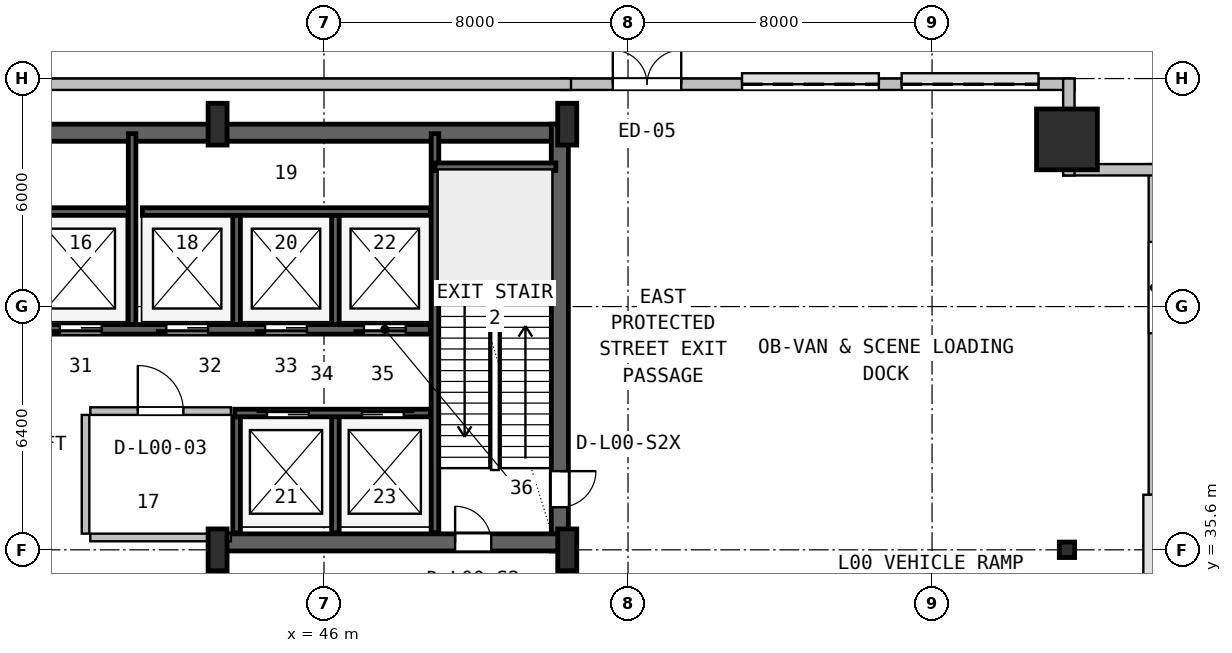
"""IFC4 building model, lengths in metres.
Left out: names, types, materials, properties, quantities, classifications, styles, units other than length and angle.
Written with IfcOpenShell. Run it as: python <this file> out.ifc"""

import sys

from ifc_helpers import new_model, si_unit, direction, frame, frame_2d, origin, origin_2d, place, context, subcontext, project, spatial, rectangle, hollow_rectangle, i_section, extrude, source, transform, mapped, element, fill, save


model = new_model("IFC4")
c1 = context("Model", 3, precision=1e-05, world=origin(), true_north=direction((0.0, 1.0)))
c2 = subcontext(c1, "Body", "Model", "MODEL_VIEW")
j1 = project(units=[si_unit("LENGTHUNIT", "METRE"), si_unit("PLANEANGLEUNIT", "RADIAN")], contexts=[c1])
p1 = place(None, origin())
s1 = spatial("IfcSite", under=j1, at=p1, CompositionType="ELEMENT")
p2 = place(p1, origin())
s2 = spatial("IfcBuilding", under=s1, at=p2, CompositionType="ELEMENT")
p3 = place(p2, origin())
s3 = spatial("IfcBuildingStorey", under=s2, at=p3, CompositionType="ELEMENT", Elevation=0.0)
p4 = place(p3, frame((15.6, 46.575, 0.0), z_axis=(0.0, 0.0, 1.0), x_axis=(1.0, 0.0, 0.0)))
e1 = element("IfcWall", 1, at=p4, inside=s3, PredefinedType="SHEAR", context=c2, shape_type="SweptSolid", body=[
    extrude(rectangle(XDim=36.8, YDim=0.45, at=frame_2d((18.4, 0.0))), origin(), (0.0, 0.0, 1.0), 5.72),
])
p5 = place(p3, frame((52.205, 35.57, 0.0), z_axis=(0.0, 0.0, 1.0), x_axis=(0.0, 1.0, 0.0)))
e2 = element("IfcWall", 2, at=p5, inside=s3, PredefinedType="SHEAR", context=c2, shape_type="SweptSolid", body=[
    extrude(rectangle(XDim=11.23, YDim=0.45, at=frame_2d((5.615, 0.0))), origin(), (0.0, 0.0, 1.0), 5.72),
])
p6 = place(p5, frame((1.15, 0.0, 0.0)))
e3 = element("IfcOpeningElement", 3, at=p6, cuts=e2, PredefinedType="OPENING", context=c2, shape_type="SweptSolid", body=[
    extrude(rectangle(XDim=0.95, YDim=2.1, at=frame_2d((0.475, 1.05))), frame((0.0, 0.235, 0.0), z_axis=(0.0, -1.0, 0.0), x_axis=(1.0, 0.0, 0.0)), (0.0, 0.0, 1.0), 0.47),
])
p7 = place(p3, frame((43.2, 35.795, 0.0), z_axis=(0.0, 0.0, 1.0), x_axis=(1.0, 0.0, 0.0)))
e4 = element("IfcWall", 4, at=p7, inside=s3, PredefinedType="SHEAR", context=c2, shape_type="SweptSolid", body=[
    extrude(rectangle(XDim=9.23, YDim=0.45, at=frame_2d((4.615, 0.0))), origin(), (0.0, 0.0, 1.0), 5.72),
])
p8 = place(p7, frame((6.25, 0.0, 0.0)))
e5 = element("IfcOpeningElement", 5, at=p8, cuts=e4, PredefinedType="OPENING", context=c2, shape_type="SweptSolid", body=[
    extrude(rectangle(XDim=0.95, YDim=2.1, at=frame_2d((0.475, 1.05))), frame((0.0, 0.235, 0.0), z_axis=(0.0, -1.0, 0.0), x_axis=(1.0, 0.0, 0.0)), (0.0, 0.0, 1.0), 0.47),
])
m1 = source(origin(), c2, "Body", "SweptSolid", [
    extrude(i_section(OverallWidth=0.5, OverallDepth=1.1, WebThickness=0.018, FlangeThickness=0.032, FilletRadius=0.018, at=origin_2d()), origin(), (0.0, 0.0, 1.0), 6.0),
])
for number, where, z_axis, x_axis in (
    (6, (43.2, 35.6, 0.0), (0.0, 0.0, 1.0), (1.0, 0.0, 0.0)),
    (7, (43.2, 46.8, 0.0), (0.0, 0.0, 1.0), (1.0, 0.0, 0.0)),
    (8, (52.4, 35.6, 0.0), (0.0, 0.0, 1.0), (1.0, 0.0, 0.0)),
    (9, (52.4, 46.8, 0.0), (0.0, 0.0, 1.0), (1.0, 0.0, 0.0)),
):
    element("IfcColumn", number, at=place(p3, frame(where, z_axis=z_axis, x_axis=x_axis)), inside=s3, PredefinedType="COLUMN", context=c2, shape_type="MappedRepresentation", body=[
        mapped(m1, transform((0.0, 0.0, 0.0), x_axis=(1.0, 0.0, 0.0), y_axis=(0.0, 1.0, 0.0), z_axis=(0.0, 0.0, 1.0), scale=1.0)),
    ])
m2 = source(origin(), c2, "Body", "SweptSolid", [
    extrude(hollow_rectangle(XDim=1.6, YDim=1.6, WallThickness=0.06, at=origin_2d()), origin(), (0.0, 0.0, 1.0), 6.0),
])
p9 = place(p3, frame((65.55, 46.4, 0.0), z_axis=(0.0, 0.0, 1.0), x_axis=(1.0, 0.0, 0.0)))
e10 = element("IfcColumn", 10, at=p9, inside=s3, PredefinedType="COLUMN", context=c2, shape_type="MappedRepresentation", body=[
    mapped(m2, transform((0.0, 0.0, 0.0), x_axis=(1.0, 0.0, 0.0), y_axis=(0.0, 1.0, 0.0), z_axis=(0.0, 0.0, 1.0), scale=1.0)),
])
m3 = source(origin(), c2, "Body", "SweptSolid", [
    extrude(i_section(OverallWidth=0.404, OverallDepth=0.407, WebThickness=0.027, FlangeThickness=0.044, FilletRadius=0.018, at=origin_2d()), origin(), (0.0, 0.0, 1.0), 6.0),
])
p10 = place(p3, frame((65.55, 35.6, 0.0), z_axis=(0.0, 0.0, 1.0), x_axis=(1.0, 0.0, 0.0)))
e11 = element("IfcColumn", 11, at=p10, inside=s3, PredefinedType="COLUMN", context=c2, shape_type="MappedRepresentation", body=[
    mapped(m3, transform((0.0, 0.0, 0.0), x_axis=(1.0, 0.0, 0.0), y_axis=(0.0, 1.0, 0.0), z_axis=(0.0, 0.0, 1.0), scale=1.0)),
])
p11 = place(p3, frame((52.25, 47.85, 0.0), z_axis=(0.0, 0.0, 1.0), x_axis=(1.0, 0.0, 0.0)))
e12 = element("IfcWall", 12, at=p11, inside=s3, PredefinedType="SOLIDWALL", context=c2, shape_type="SweptSolid", body=[
    extrude(rectangle(XDim=13.5, YDim=0.3, at=frame_2d((6.75, 0.0))), origin(), (0.0, 0.0, 1.0), 5.7),
])
p12 = place(p11, frame((1.35, 0.0, 0.0)))
e13 = element("IfcOpeningElement", 13, at=p12, cuts=e12, PredefinedType="OPENING", context=c2, shape_type="SweptSolid", body=[
    extrude(rectangle(XDim=1.8, YDim=2.15, at=frame_2d((0.9, 1.075))), frame((0.0, 0.16, 0.0), z_axis=(0.0, -1.0, 0.0), x_axis=(1.0, 0.0, 0.0)), (0.0, 0.0, 1.0), 0.32),
])
p13 = place(p11, frame((4.75, 0.0, 0.0)))
e14 = element("IfcOpeningElement", 14, at=p13, cuts=e12, PredefinedType="OPENING", context=c2, shape_type="SweptSolid", body=[
    extrude(rectangle(XDim=3.6, YDim=2.7, at=frame_2d((1.8, 1.35))), frame((0.0, 0.16, 0.0), z_axis=(0.0, -1.0, 0.0), x_axis=(1.0, 0.0, 0.0)), (0.0, 0.0, 1.0), 0.32),
])
p14 = place(p11, frame((8.95, 0.0, 0.0)))
e15 = element("IfcOpeningElement", 15, at=p14, cuts=e12, PredefinedType="OPENING", context=c2, shape_type="SweptSolid", body=[
    extrude(rectangle(XDim=3.6, YDim=2.7, at=frame_2d((1.8, 1.35))), frame((0.0, 0.16, 0.0), z_axis=(0.0, -1.0, 0.0), x_axis=(1.0, 0.0, 0.0)), (0.0, 0.0, 1.0), 0.32),
])
p15 = place(p3, frame((15.5, 47.85, 0.0), z_axis=(0.0, 0.0, 1.0), x_axis=(1.0, 0.0, 0.0)))
e16 = element("IfcWall", 16, at=p15, inside=s3, PredefinedType="SOLIDWALL", context=c2, shape_type="SweptSolid", body=[
    extrude(rectangle(XDim=37.0, YDim=0.3, at=frame_2d((18.5, 0.0))), origin(), (0.0, 0.0, 1.0), 5.7),
])
p16 = place(p3, frame((67.85, 26.5, 0.0), z_axis=(0.0, 0.0, 1.0), x_axis=(0.0, 1.0, 0.0)))
e17 = element("IfcWall", 17, at=p16, inside=s3, PredefinedType="SOLIDWALL", context=c2, shape_type="SweptSolid", body=[
    extrude(rectangle(XDim=19.25, YDim=0.3, at=frame_2d((9.625, 0.0))), origin(), (0.0, 0.0, 1.0), 5.7),
])
p17 = place(p16, frame((6.95, 0.0, 0.0)))
e18 = element("IfcOpeningElement", 18, at=p17, cuts=e17, PredefinedType="OPENING", context=c2, shape_type="SweptSolid", body=[
    extrude(rectangle(XDim=3.6, YDim=2.7, at=frame_2d((1.8, 1.35))), frame((0.0, 0.16, 0.0), z_axis=(0.0, -1.0, 0.0), x_axis=(1.0, 0.0, 0.0)), (0.0, 0.0, 1.0), 0.32),
])
p18 = place(p16, frame((14.8, 0.0, 0.9)))
e19 = element("IfcOpeningElement", 19, at=p18, cuts=e17, PredefinedType="OPENING", context=c2, shape_type="SweptSolid", body=[
    extrude(rectangle(XDim=2.4, YDim=2.4, at=frame_2d((1.2, 1.2))), frame((0.0, 0.16, 0.0), z_axis=(0.0, -1.0, 0.0), x_axis=(1.0, 0.0, 0.0)), (0.0, 0.0, 1.0), 0.32),
])
for number, where, z_axis, x_axis in (
    (20, (65.45, 45.6, 0.0), (0.0, 0.0, 1.0), (1.0, 0.0, 0.0)),
    (21, (65.6, 45.45, 0.0), (0.0, 0.0, 1.0), (0.0, 1.0, 0.0)),
):
    element("IfcWall", number, at=place(p3, frame(where, z_axis=z_axis, x_axis=x_axis)), inside=s3, PredefinedType="SOLIDWALL", context=c2, shape_type="SweptSolid", body=[
        extrude(rectangle(XDim=2.55, YDim=0.3, at=frame_2d((1.275, 0.0))), origin(), (0.0, 0.0, 1.0), 4.783),
    ])
p19 = place(p3, frame((48.92, 36.05, 0.0), z_axis=(0.0, 0.0, 1.0), x_axis=(0.0, 1.0, 0.0)))
e22 = element("IfcWall", 22, at=p19, inside=s3, PredefinedType="SHEAR", context=c2, shape_type="SweptSolid", body=[
    extrude(rectangle(XDim=10.5, YDim=0.2, at=frame_2d((5.25, 0.0))), origin(), (0.0, 0.0, 1.0), 5.72),
])
p20 = place(p3, frame((48.92, 45.68, 0.0), z_axis=(0.0, 0.0, 1.0), x_axis=(1.0, 0.0, 0.0)))
e23 = element("IfcWall", 23, at=p20, inside=s3, PredefinedType="SHEAR", context=c2, shape_type="SweptSolid", body=[
    extrude(rectangle(XDim=3.18, YDim=0.2, at=frame_2d((1.59, 0.0))), origin(), (0.0, 0.0, 1.0), 5.72),
])
p21 = place(p3, frame((24.98, 41.4, 0.0), z_axis=(0.0, 0.0, 1.0), x_axis=(1.0, 0.0, 0.0)))
e24 = element("IfcWall", 24, at=p21, inside=s3, PredefinedType="SHEAR", context=c2, shape_type="SweptSolid", body=[
    extrude(rectangle(XDim=23.82, YDim=0.25, at=frame_2d((11.91, 0.0))), origin(), (0.0, 0.0, 1.0), 5.72),
])
p22 = place(p21, frame((0.87, 0.0, 0.0)))
e25 = element("IfcOpeningElement", 25, at=p22, cuts=e24, PredefinedType="OPENING", context=c2, shape_type="SweptSolid", body=[
    extrude(rectangle(XDim=1.1, YDim=2.18, at=frame_2d((0.55, 1.09))), frame((0.0, 0.135, 0.0), z_axis=(0.0, -1.0, 0.0), x_axis=(1.0, 0.0, 0.0)), (0.0, 0.0, 1.0), 0.27),
])
p23 = place(p21, frame((3.47, 0.0, 0.0)))
e26 = element("IfcOpeningElement", 26, at=p23, cuts=e24, PredefinedType="OPENING", context=c2, shape_type="SweptSolid", body=[
    extrude(rectangle(XDim=1.1, YDim=2.18, at=frame_2d((0.55, 1.09))), frame((0.0, 0.135, 0.0), z_axis=(0.0, -1.0, 0.0), x_axis=(1.0, 0.0, 0.0)), (0.0, 0.0, 1.0), 0.27),
])
p24 = place(p21, frame((6.07, 0.0, 0.0)))
e27 = element("IfcOpeningElement", 27, at=p24, cuts=e24, PredefinedType="OPENING", context=c2, shape_type="SweptSolid", body=[
    extrude(rectangle(XDim=1.1, YDim=2.18, at=frame_2d((0.55, 1.09))), frame((0.0, 0.135, 0.0), z_axis=(0.0, -1.0, 0.0), x_axis=(1.0, 0.0, 0.0)), (0.0, 0.0, 1.0), 0.27),
])
p25 = place(p21, frame((8.87, 0.0, 0.0)))
e28 = element("IfcOpeningElement", 28, at=p25, cuts=e24, PredefinedType="OPENING", context=c2, shape_type="SweptSolid", body=[
    extrude(rectangle(XDim=1.1, YDim=2.18, at=frame_2d((0.55, 1.09))), frame((0.0, 0.135, 0.0), z_axis=(0.0, -1.0, 0.0), x_axis=(1.0, 0.0, 0.0)), (0.0, 0.0, 1.0), 0.27),
])
p26 = place(p21, frame((11.47, 0.0, 0.0)))
e29 = element("IfcOpeningElement", 29, at=p26, cuts=e24, PredefinedType="OPENING", context=c2, shape_type="SweptSolid", body=[
    extrude(rectangle(XDim=1.1, YDim=2.18, at=frame_2d((0.55, 1.09))), frame((0.0, 0.135, 0.0), z_axis=(0.0, -1.0, 0.0), x_axis=(1.0, 0.0, 0.0)), (0.0, 0.0, 1.0), 0.27),
])
p27 = place(p21, frame((14.07, 0.0, 0.0)))
e30 = element("IfcOpeningElement", 30, at=p27, cuts=e24, PredefinedType="OPENING", context=c2, shape_type="SweptSolid", body=[
    extrude(rectangle(XDim=1.1, YDim=2.18, at=frame_2d((0.55, 1.09))), frame((0.0, 0.135, 0.0), z_axis=(0.0, -1.0, 0.0), x_axis=(1.0, 0.0, 0.0)), (0.0, 0.0, 1.0), 0.27),
])
p28 = place(p21, frame((16.87, 0.0, 0.0)))
e31 = element("IfcOpeningElement", 31, at=p28, cuts=e24, PredefinedType="OPENING", context=c2, shape_type="SweptSolid", body=[
    extrude(rectangle(XDim=1.1, YDim=2.18, at=frame_2d((0.55, 1.09))), frame((0.0, 0.135, 0.0), z_axis=(0.0, -1.0, 0.0), x_axis=(1.0, 0.0, 0.0)), (0.0, 0.0, 1.0), 0.27),
])
p29 = place(p21, frame((19.47, 0.0, 0.0)))
e32 = element("IfcOpeningElement", 32, at=p29, cuts=e24, PredefinedType="OPENING", context=c2, shape_type="SweptSolid", body=[
    extrude(rectangle(XDim=1.1, YDim=2.18, at=frame_2d((0.55, 1.09))), frame((0.0, 0.135, 0.0), z_axis=(0.0, -1.0, 0.0), x_axis=(1.0, 0.0, 0.0)), (0.0, 0.0, 1.0), 0.27),
])
p30 = place(p21, frame((22.07, 0.0, 0.0)))
e33 = element("IfcOpeningElement", 33, at=p30, cuts=e24, PredefinedType="OPENING", context=c2, shape_type="SweptSolid", body=[
    extrude(rectangle(XDim=1.1, YDim=2.18, at=frame_2d((0.55, 1.09))), frame((0.0, 0.135, 0.0), z_axis=(0.0, -1.0, 0.0), x_axis=(1.0, 0.0, 0.0)), (0.0, 0.0, 1.0), 0.27),
])
p31 = place(p3, frame((33.22, 44.5, 0.0), z_axis=(0.0, 0.0, 1.0), x_axis=(1.0, 0.0, 0.0)))
e34 = element("IfcWall", 34, at=p31, inside=s3, PredefinedType="SHEAR", context=c2, shape_type="SweptSolid", body=[
    extrude(rectangle(XDim=7.63, YDim=0.2, at=frame_2d((3.815, 0.0))), origin(), (0.0, 0.0, 1.0), 5.72),
])
p32 = place(p3, frame((40.95, 41.53, 0.0), z_axis=(0.0, 0.0, 1.0), x_axis=(0.0, 1.0, 0.0)))
e35 = element("IfcWall", 35, at=p32, inside=s3, PredefinedType="SHEAR", context=c2, shape_type="SweptSolid", body=[
    extrude(rectangle(XDim=5.02, YDim=0.2, at=frame_2d((2.51, 0.0))), origin(), (0.0, 0.0, 1.0), 5.72),
])
p33 = place(p3, frame((41.22, 44.5, 0.0), z_axis=(0.0, 0.0, 1.0), x_axis=(1.0, 0.0, 0.0)))
e36 = element("IfcWall", 36, at=p33, inside=s3, PredefinedType="SHEAR", context=c2, shape_type="SweptSolid", body=[
    extrude(rectangle(XDim=7.58, YDim=0.2, at=frame_2d((3.79, 0.0))), origin(), (0.0, 0.0, 1.0), 5.72),
])
for number, where, z_axis, x_axis in (
    (37, (43.7, 41.53, 0.0), (0.0, 0.0, 1.0), (0.0, 1.0, 0.0)),
    (38, (46.3, 41.53, 0.0), (0.0, 0.0, 1.0), (0.0, 1.0, 0.0)),
):
    element("IfcWall", number, at=place(p3, frame(where, z_axis=z_axis, x_axis=x_axis)), inside=s3, PredefinedType="SHEAR", context=c2, shape_type="SweptSolid", body=[
        extrude(rectangle(XDim=2.87, YDim=0.2, at=frame_2d((1.435, 0.0))), origin(), (0.0, 0.0, 1.0), 5.72),
    ])
for number, where, z_axis, x_axis in (
    (39, (43.7, 36.05, 0.0), (0.0, 0.0, 1.0), (0.0, 1.0, 0.0)),
    (40, (46.3, 36.05, 0.0), (0.0, 0.0, 1.0), (0.0, 1.0, 0.0)),
):
    element("IfcWall", number, at=place(p3, frame(where, z_axis=z_axis, x_axis=x_axis)), inside=s3, PredefinedType="SHEAR", context=c2, shape_type="SweptSolid", body=[
        extrude(rectangle(XDim=3.05, YDim=0.2, at=frame_2d((1.525, 0.0))), origin(), (0.0, 0.0, 1.0), 5.72),
    ])
p34 = place(p3, frame((43.65, 39.2, 0.0), z_axis=(0.0, 0.0, 1.0), x_axis=(1.0, 0.0, 0.0)))
e41 = element("IfcWall", 41, at=p34, inside=s3, PredefinedType="SHEAR", context=c2, shape_type="SweptSolid", body=[
    extrude(rectangle(XDim=5.15, YDim=0.2, at=frame_2d((2.575, 0.0))), origin(), (0.0, 0.0, 1.0), 5.72),
])
p35 = place(p34, frame((0.85, 0.0, 0.0)))
e42 = element("IfcOpeningElement", 42, at=p35, cuts=e41, PredefinedType="OPENING", context=c2, shape_type="SweptSolid", body=[
    extrude(rectangle(XDim=1.1, YDim=2.18, at=frame_2d((0.55, 1.09))), frame((0.0, 0.11, 0.0), z_axis=(0.0, -1.0, 0.0), x_axis=(1.0, 0.0, 0.0)), (0.0, 0.0, 1.0), 0.22),
])
p36 = place(p34, frame((3.35, 0.0, 0.0)))
e43 = element("IfcOpeningElement", 43, at=p36, cuts=e41, PredefinedType="OPENING", context=c2, shape_type="SweptSolid", body=[
    extrude(rectangle(XDim=1.1, YDim=2.18, at=frame_2d((0.55, 1.09))), frame((0.0, 0.11, 0.0), z_axis=(0.0, -1.0, 0.0), x_axis=(1.0, 0.0, 0.0)), (0.0, 0.0, 1.0), 0.22),
])
p37 = place(p3, frame((39.85, 35.925, 0.0), z_axis=(0.0, 0.0, 1.0), x_axis=(1.0, 0.0, 0.0)))
e44 = element("IfcWall", 44, at=p37, inside=s3, PredefinedType="SOLIDWALL", context=c2, shape_type="SweptSolid", body=[
    extrude(rectangle(XDim=3.7, YDim=0.2, at=frame_2d((1.85, 0.0))), origin(), (0.0, 0.0, 1.0), 4.783),
])
p38 = place(p3, frame((39.85, 39.25, 0.0), z_axis=(0.0, 0.0, 1.0), x_axis=(1.0, 0.0, 0.0)))
e45 = element("IfcWall", 45, at=p38, inside=s3, PredefinedType="SOLIDWALL", context=c2, shape_type="SweptSolid", body=[
    extrude(rectangle(XDim=3.7, YDim=0.2, at=frame_2d((1.85, 0.0))), origin(), (0.0, 0.0, 1.0), 5.7),
])
p39 = place(p38, frame((1.25, 0.0, 0.0)))
e46 = element("IfcOpeningElement", 46, at=p39, cuts=e45, PredefinedType="OPENING", context=c2, shape_type="SweptSolid", body=[
    extrude(rectangle(XDim=1.2, YDim=2.1, at=frame_2d((0.6, 1.05))), frame((0.0, 0.11, 0.0), z_axis=(0.0, -1.0, 0.0), x_axis=(1.0, 0.0, 0.0)), (0.0, 0.0, 1.0), 0.22),
])
p40 = place(p3, frame((39.725, 36.025, 0.0), z_axis=(0.0, 0.0, 1.0), x_axis=(0.0, 1.0, 0.0)))
e47 = element("IfcWall", 47, at=p40, inside=s3, PredefinedType="SOLIDWALL", context=c2, shape_type="SweptSolid", body=[
    extrude(rectangle(XDim=3.125, YDim=0.2, at=frame_2d((1.562, 0.0))), origin(), (0.0, 0.0, 1.0), 5.7),
])
m4 = source(origin(), c2, "Body", "SweptSolid", [
    extrude(rectangle(XDim=1.8, YDim=2.15, at=frame_2d((0.9, 1.075))), frame((0.0, 0.025, 0.0), z_axis=(0.0, -1.0, 0.0), x_axis=(1.0, 0.0, 0.0)), (0.0, 0.0, 1.0), 0.05),
])
p41 = place(p12, origin())
e48 = element("IfcDoor", 48, at=p41, inside=s3, OperationType="DOUBLE_DOOR_SINGLE_SWING", PredefinedType="DOOR", context=c2, shape_type="MappedRepresentation", body=[
    mapped(m4, transform((0.0, 0.0, 0.0), x_axis=(1.0, 0.0, 0.0), y_axis=(0.0, 1.0, 0.0), z_axis=(0.0, 0.0, 1.0), scale=1.0)),
])
fill(e13, e48)
m5 = source(origin(), c2, "Body", "SweptSolid", [
    extrude(rectangle(XDim=3.6, YDim=2.7, at=frame_2d((1.8, 1.35))), frame((0.0, 0.025, 0.0), z_axis=(0.0, -1.0, 0.0), x_axis=(1.0, 0.0, 0.0)), (0.0, 0.0, 1.0), 0.05),
])
p42 = place(p13, origin())
e49 = element("IfcDoor", 49, at=p42, inside=s3, OperationType="ROLLINGUP", PredefinedType="GATE", context=c2, shape_type="MappedRepresentation", body=[
    mapped(m5, transform((0.0, 0.0, 0.0), x_axis=(1.0, 0.0, 0.0), y_axis=(0.0, 1.0, 0.0), z_axis=(0.0, 0.0, 1.0), scale=1.0)),
])
fill(e14, e49)
p43 = place(p14, origin())
e50 = element("IfcDoor", 50, at=p43, inside=s3, OperationType="ROLLINGUP", PredefinedType="GATE", context=c2, shape_type="MappedRepresentation", body=[
    mapped(m5, transform((0.0, 0.0, 0.0), x_axis=(1.0, 0.0, 0.0), y_axis=(0.0, 1.0, 0.0), z_axis=(0.0, 0.0, 1.0), scale=1.0)),
])
fill(e15, e50)
m6 = source(origin(), c2, "Body", "SweptSolid", [
    extrude(rectangle(XDim=0.95, YDim=2.1, at=frame_2d((0.475, 1.05))), frame((0.0, 0.025, 0.0), z_axis=(0.0, -1.0, 0.0), x_axis=(1.0, 0.0, 0.0)), (0.0, 0.0, 1.0), 0.05),
])
p44 = place(p8, origin())
e51 = element("IfcDoor", 51, at=p44, inside=s3, OperationType="SINGLE_SWING_LEFT", PredefinedType="DOOR", context=c2, shape_type="MappedRepresentation", body=[
    mapped(m6, transform((0.0, 0.0, 0.0), x_axis=(1.0, 0.0, 0.0), y_axis=(0.0, 1.0, 0.0), z_axis=(0.0, 0.0, 1.0), scale=1.0)),
])
fill(e5, e51)
m7 = source(origin(), c2, "Body", "SweptSolid", [
    extrude(rectangle(XDim=1.1, YDim=2.18, at=frame_2d((0.55, 1.09))), frame((0.0, 0.025, 0.0), z_axis=(0.0, -1.0, 0.0), x_axis=(1.0, 0.0, 0.0)), (0.0, 0.0, 1.0), 0.05),
])
p45 = place(p27, frame((1.1, 0.0, 0.0), z_axis=(0.0, 0.0, 1.0), x_axis=(-1.0, 0.0, 0.0)))
e52 = element("IfcDoor", 52, at=p45, inside=s3, OperationType="SLIDING_TO_LEFT", PredefinedType="DOOR", context=c2, shape_type="MappedRepresentation", body=[
    mapped(m7, transform((0.0, 0.0, 0.0), x_axis=(1.0, 0.0, 0.0), y_axis=(0.0, 1.0, 0.0), z_axis=(0.0, 0.0, 1.0), scale=1.0)),
])
fill(e30, e52)
p46 = place(p28, frame((1.1, 0.0, 0.0), z_axis=(0.0, 0.0, 1.0), x_axis=(-1.0, 0.0, 0.0)))
e53 = element("IfcDoor", 53, at=p46, inside=s3, OperationType="SLIDING_TO_LEFT", PredefinedType="DOOR", context=c2, shape_type="MappedRepresentation", body=[
    mapped(m7, transform((0.0, 0.0, 0.0), x_axis=(1.0, 0.0, 0.0), y_axis=(0.0, 1.0, 0.0), z_axis=(0.0, 0.0, 1.0), scale=1.0)),
])
fill(e31, e53)
p47 = place(p29, frame((1.1, 0.0, 0.0), z_axis=(0.0, 0.0, 1.0), x_axis=(-1.0, 0.0, 0.0)))
e54 = element("IfcDoor", 54, at=p47, inside=s3, OperationType="SLIDING_TO_LEFT", PredefinedType="DOOR", context=c2, shape_type="MappedRepresentation", body=[
    mapped(m7, transform((0.0, 0.0, 0.0), x_axis=(1.0, 0.0, 0.0), y_axis=(0.0, 1.0, 0.0), z_axis=(0.0, 0.0, 1.0), scale=1.0)),
])
fill(e32, e54)
p48 = place(p30, frame((1.1, 0.0, 0.0), z_axis=(0.0, 0.0, 1.0), x_axis=(-1.0, 0.0, 0.0)))
e55 = element("IfcDoor", 55, at=p48, inside=s3, OperationType="SLIDING_TO_LEFT", PredefinedType="DOOR", context=c2, shape_type="MappedRepresentation", body=[
    mapped(m7, transform((0.0, 0.0, 0.0), x_axis=(1.0, 0.0, 0.0), y_axis=(0.0, 1.0, 0.0), z_axis=(0.0, 0.0, 1.0), scale=1.0)),
])
fill(e33, e55)
p49 = place(p35, origin())
e56 = element("IfcDoor", 56, at=p49, inside=s3, OperationType="SLIDING_TO_LEFT", PredefinedType="DOOR", context=c2, shape_type="MappedRepresentation", body=[
    mapped(m7, transform((0.0, 0.0, 0.0), x_axis=(1.0, 0.0, 0.0), y_axis=(0.0, 1.0, 0.0), z_axis=(0.0, 0.0, 1.0), scale=1.0)),
])
fill(e42, e56)
p50 = place(p36, origin())
e57 = element("IfcDoor", 57, at=p50, inside=s3, OperationType="SLIDING_TO_RIGHT", PredefinedType="DOOR", context=c2, shape_type="MappedRepresentation", body=[
    mapped(m7, transform((0.0, 0.0, 0.0), x_axis=(1.0, 0.0, 0.0), y_axis=(0.0, 1.0, 0.0), z_axis=(0.0, 0.0, 1.0), scale=1.0)),
])
fill(e43, e57)
p51 = place(p6, frame((0.95, 0.0, 0.0), z_axis=(0.0, 0.0, 1.0), x_axis=(-1.0, 0.0, 0.0)))
e58 = element("IfcDoor", 58, at=p51, inside=s3, OperationType="SINGLE_SWING_RIGHT", PredefinedType="DOOR", context=c2, shape_type="MappedRepresentation", body=[
    mapped(m6, transform((0.0, 0.0, 0.0), x_axis=(1.0, 0.0, 0.0), y_axis=(0.0, 1.0, 0.0), z_axis=(0.0, 0.0, 1.0), scale=1.0)),
])
fill(e3, e58)
m8 = source(origin(), c2, "Body", "SweptSolid", [
    extrude(rectangle(XDim=1.2, YDim=2.1, at=frame_2d((0.6, 1.05))), frame((0.0, 0.025, 0.0), z_axis=(0.0, -1.0, 0.0), x_axis=(1.0, 0.0, 0.0)), (0.0, 0.0, 1.0), 0.05),
])
p52 = place(p39, origin())
e59 = element("IfcDoor", 59, at=p52, inside=s3, OperationType="SINGLE_SWING_LEFT", PredefinedType="DOOR", context=c2, shape_type="MappedRepresentation", body=[
    mapped(m8, transform((0.0, 0.0, 0.0), x_axis=(1.0, 0.0, 0.0), y_axis=(0.0, 1.0, 0.0), z_axis=(0.0, 0.0, 1.0), scale=1.0)),
])
fill(e46, e59)
save(model, sys.argv[1])
